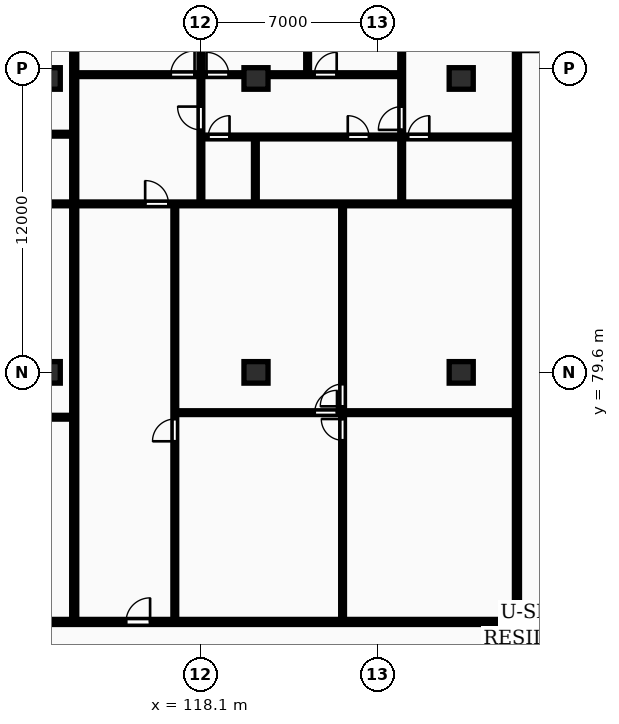
"""IFC4 building model, lengths in metres.
Left out: names, types, materials, properties, quantities, classifications, styles, units other than length and angle.
Written with IfcOpenShell. Run it as: python <this file> out.ifc"""

import sys

from ifc_helpers import new_model, si_unit, direction, frame, frame_2d, origin, origin_2d, place, context, subcontext, project, spatial, rectangle, extrude, element, fill, save


model = new_model("IFC4")
c1 = context("Model", 3, precision=1e-05, world=origin(), true_north=direction((0.0, 1.0)))
c2 = subcontext(c1, "Body", "Model", "MODEL_VIEW")
j1 = project(units=[si_unit("LENGTHUNIT", "METRE"), si_unit("PLANEANGLEUNIT", "RADIAN")], contexts=[c1])
p1 = place(None, origin())
s1 = spatial("IfcSite", under=j1, at=p1, CompositionType="ELEMENT")
p2 = place(p1, origin())
s2 = spatial("IfcBuilding", under=s1, at=p2, CompositionType="ELEMENT")
p3 = place(p2, frame((0.0, 0.0, 126.3)))
s3 = spatial("IfcBuildingStorey", under=s2, at=p3, CompositionType="ELEMENT", Elevation=126.3)
for number, where, z_axis, x_axis in (
    (1, (112.1, 79.6, 0.0), (0.0, 0.0, 1.0), (1.0, 0.0, 0.0)),
    (2, (112.1, 91.2, 0.0), (0.0, 0.0, 1.0), (1.0, 0.0, 0.0)),
    (3, (120.3, 79.6, 0.0), (0.0, 0.0, 1.0), (1.0, 0.0, 0.0)),
    (4, (120.3, 91.2, 0.0), (0.0, 0.0, 1.0), (1.0, 0.0, 0.0)),
    (5, (128.4, 79.6, 0.0), (0.0, 0.0, 1.0), (1.0, 0.0, 0.0)),
    (6, (128.4, 91.2, 0.0), (0.0, 0.0, 1.0), (1.0, 0.0, 0.0)),
):
    element("IfcColumn", number, at=place(p3, frame(where, z_axis=z_axis, x_axis=x_axis)), inside=s3, PredefinedType="COLUMN", context=c2, shape_type="SweptSolid", body=[
        extrude(rectangle(XDim=0.95, YDim=0.85, at=origin_2d()), origin(), (0.0, 0.0, 1.0), 3.25),
    ])
for number, where, z_axis, x_axis in (
    (7, (130.6, 69.83, 0.0), (0.0, 0.0, 1.0), (0.0, 1.0, 0.0)),
    (8, (113.125, 69.83, 0.0), (0.0, 0.0, 1.0), (0.0, 1.0, 0.0)),
):
    element("IfcWall", number, at=place(p3, frame(where, z_axis=z_axis, x_axis=x_axis)), inside=s3, PredefinedType="PARTITIONING", context=c2, shape_type="SweptSolid", body=[
        extrude(rectangle(XDim=26.07, YDim=0.2, at=frame_2d((13.035, 0.0))), origin(), (0.0, 0.0, 1.0), 2.97),
    ])
p4 = place(p3, frame((96.867, 77.83, 0.0), z_axis=(0.0, 0.0, 1.0), x_axis=(1.0, 0.0, 0.0)))
e9 = element("IfcWall", 9, at=p4, inside=s3, PredefinedType="PARTITIONING", context=c2, shape_type="SweptSolid", body=[
    extrude(rectangle(XDim=16.177, YDim=0.15, at=frame_2d((8.089, 0.0))), origin(), (0.0, 0.0, 1.0), 2.97),
])
p5 = place(p4, frame((3.45, 0.0, 0.0)))
e10 = element("IfcOpeningElement", 10, at=p5, cuts=e9, PredefinedType="OPENING", context=c2, shape_type="SweptSolid", body=[
    extrude(rectangle(XDim=0.88, YDim=2.06, at=frame_2d((0.44, 1.03))), frame((0.0, 0.085, 0.0), z_axis=(0.0, -1.0, 0.0), x_axis=(1.0, 0.0, 0.0)), (0.0, 0.0, 1.0), 0.17),
])
p6 = place(p3, frame((97.667, 89.0, 0.0), z_axis=(0.0, 0.0, 1.0), x_axis=(1.0, 0.0, 0.0)))
e11 = element("IfcWall", 11, at=p6, inside=s3, PredefinedType="PARTITIONING", context=c2, shape_type="SweptSolid", body=[
    extrude(rectangle(XDim=15.377, YDim=0.15, at=frame_2d((7.689, 0.0))), origin(), (0.0, 0.0, 1.0), 2.97),
])
p7 = place(p6, frame((1.191, 0.0, 0.0)))
e12 = element("IfcOpeningElement", 12, at=p7, cuts=e11, PredefinedType="OPENING", context=c2, shape_type="SweptSolid", body=[
    extrude(rectangle(XDim=0.84, YDim=2.04, at=frame_2d((0.42, 1.02))), frame((0.0, 0.085, 0.0), z_axis=(0.0, -1.0, 0.0), x_axis=(1.0, 0.0, 0.0)), (0.0, 0.0, 1.0), 0.17),
])
p8 = place(p6, frame((7.269, 0.0, 0.0)))
e13 = element("IfcOpeningElement", 13, at=p8, cuts=e11, PredefinedType="OPENING", context=c2, shape_type="SweptSolid", body=[
    extrude(rectangle(XDim=0.84, YDim=2.04, at=frame_2d((0.42, 1.02))), frame((0.0, 0.085, 0.0), z_axis=(0.0, -1.0, 0.0), x_axis=(1.0, 0.0, 0.0)), (0.0, 0.0, 1.0), 0.17),
])
p9 = place(p6, frame((10.938, 0.0, 0.0)))
e14 = element("IfcOpeningElement", 14, at=p9, cuts=e11, PredefinedType="OPENING", context=c2, shape_type="SweptSolid", body=[
    extrude(rectangle(XDim=0.84, YDim=2.04, at=frame_2d((0.42, 1.02))), frame((0.0, 0.085, 0.0), z_axis=(0.0, -1.0, 0.0), x_axis=(1.0, 0.0, 0.0)), (0.0, 0.0, 1.0), 0.17),
])
p10 = place(p3, frame((92.917, 86.25, 0.0), z_axis=(0.0, 0.0, 1.0), x_axis=(1.0, 0.0, 0.0)))
e15 = element("IfcWall", 15, at=p10, inside=s3, PredefinedType="PARTITIONING", context=c2, shape_type="SweptSolid", body=[
    extrude(rectangle(XDim=20.127, YDim=0.15, at=frame_2d((10.064, 0.0))), origin(), (0.0, 0.0, 1.0), 2.97),
])
p11 = place(p10, frame((2.72, 0.0, 0.0)))
e16 = element("IfcOpeningElement", 16, at=p11, cuts=e15, PredefinedType="OPENING", context=c2, shape_type="SweptSolid", body=[
    extrude(rectangle(XDim=0.92, YDim=2.08, at=frame_2d((0.46, 1.04))), frame((0.0, 0.085, 0.0), z_axis=(0.0, -1.0, 0.0), x_axis=(1.0, 0.0, 0.0)), (0.0, 0.0, 1.0), 0.17),
])
p12 = place(p3, frame((123.718, 69.81, 0.0), z_axis=(0.0, 0.0, 1.0), x_axis=(0.0, 1.0, 0.0)))
e17 = element("IfcWall", 17, at=p12, inside=s3, PredefinedType="PARTITIONING", context=c2, shape_type="SweptSolid", body=[
    extrude(rectangle(XDim=16.4, YDim=0.15, at=frame_2d((8.2, 0.0))), origin(), (0.0, 0.0, 1.0), 2.97),
])
p13 = place(p12, frame((7.11, 0.0, 0.0)))
e18 = element("IfcOpeningElement", 18, at=p13, cuts=e17, PredefinedType="OPENING", context=c2, shape_type="SweptSolid", body=[
    extrude(rectangle(XDim=0.84, YDim=2.04, at=frame_2d((0.42, 1.02))), frame((0.0, 0.085, 0.0), z_axis=(0.0, -1.0, 0.0), x_axis=(1.0, 0.0, 0.0)), (0.0, 0.0, 1.0), 0.17),
])
p14 = place(p12, frame((8.45, 0.0, 0.0)))
e19 = element("IfcOpeningElement", 19, at=p14, cuts=e17, PredefinedType="OPENING", context=c2, shape_type="SweptSolid", body=[
    extrude(rectangle(XDim=0.88, YDim=2.06, at=frame_2d((0.44, 1.03))), frame((0.0, 0.085, 0.0), z_axis=(0.0, -1.0, 0.0), x_axis=(1.0, 0.0, 0.0)), (0.0, 0.0, 1.0), 0.17),
])
p15 = place(p3, frame((117.155, 78.01, 0.0), z_axis=(0.0, 0.0, 1.0), x_axis=(1.0, 0.0, 0.0)))
e20 = element("IfcWall", 20, at=p15, inside=s3, PredefinedType="PARTITIONING", context=c2, shape_type="SweptSolid", body=[
    extrude(rectangle(XDim=13.365, YDim=0.15, at=frame_2d((6.683, 0.0))), origin(), (0.0, 0.0, 1.0), 2.97),
])
p16 = place(p15, frame((5.462, 0.0, 0.0)))
e21 = element("IfcOpeningElement", 21, at=p16, cuts=e20, PredefinedType="OPENING", context=c2, shape_type="SweptSolid", body=[
    extrude(rectangle(XDim=0.88, YDim=2.06, at=frame_2d((0.44, 1.03))), frame((0.0, 0.085, 0.0), z_axis=(0.0, -1.0, 0.0), x_axis=(1.0, 0.0, 0.0)), (0.0, 0.0, 1.0), 0.17),
])
p17 = place(p3, frame((117.095, 69.81, 0.0), z_axis=(0.0, 0.0, 1.0), x_axis=(0.0, 1.0, 0.0)))
e22 = element("IfcWall", 22, at=p17, inside=s3, PredefinedType="PARTITIONING", context=c2, shape_type="SweptSolid", body=[
    extrude(rectangle(XDim=16.4, YDim=0.15, at=frame_2d((8.2, 0.0))), origin(), (0.0, 0.0, 1.0), 2.97),
])
p18 = place(p17, frame((7.07, 0.0, 0.0)))
e23 = element("IfcOpeningElement", 23, at=p18, cuts=e22, PredefinedType="OPENING", context=c2, shape_type="SweptSolid", body=[
    extrude(rectangle(XDim=0.88, YDim=2.06, at=frame_2d((0.44, 1.03))), frame((0.0, 0.085, 0.0), z_axis=(0.0, -1.0, 0.0), x_axis=(1.0, 0.0, 0.0)), (0.0, 0.0, 1.0), 0.17),
])
p19 = place(p3, frame((120.275, 86.29, 0.0), z_axis=(0.0, 0.0, 1.0), x_axis=(0.0, 1.0, 0.0)))
e24 = element("IfcWall", 24, at=p19, inside=s3, PredefinedType="PARTITIONING", context=c2, shape_type="SweptSolid", body=[
    extrude(rectangle(XDim=2.58, YDim=0.15, at=frame_2d((1.29, 0.0))), origin(), (0.0, 0.0, 1.0), 2.277),
])
p20 = place(p3, frame((122.337, 91.43, 0.0), z_axis=(0.0, 0.0, 1.0), x_axis=(0.0, 1.0, 0.0)))
e25 = element("IfcWall", 25, at=p20, inside=s3, PredefinedType="PARTITIONING", context=c2, shape_type="SweptSolid", body=[
    extrude(rectangle(XDim=4.47, YDim=0.15, at=frame_2d((2.235, 0.0))), origin(), (0.0, 0.0, 1.0), 2.97),
])
p21 = place(p3, frame((118.125, 86.29, 0.0), z_axis=(0.0, 0.0, 1.0), x_axis=(0.0, 1.0, 0.0)))
e26 = element("IfcWall", 26, at=p21, inside=s3, PredefinedType="PARTITIONING", context=c2, shape_type="SweptSolid", body=[
    extrude(rectangle(XDim=9.61, YDim=0.15, at=frame_2d((4.805, 0.0))), origin(), (0.0, 0.0, 1.0), 2.97),
])
p22 = place(p21, frame((2.88, 0.0, 0.0)))
e27 = element("IfcOpeningElement", 27, at=p22, cuts=e26, PredefinedType="OPENING", context=c2, shape_type="SweptSolid", body=[
    extrude(rectangle(XDim=0.92, YDim=2.08, at=frame_2d((0.46, 1.04))), frame((0.0, 0.085, 0.0), z_axis=(0.0, -1.0, 0.0), x_axis=(1.0, 0.0, 0.0)), (0.0, 0.0, 1.0), 0.17),
])
p23 = place(p3, frame((126.05, 86.29, 0.0), z_axis=(0.0, 0.0, 1.0), x_axis=(0.0, 1.0, 0.0)))
e28 = element("IfcWall", 28, at=p23, inside=s3, PredefinedType="PARTITIONING", context=c2, shape_type="SweptSolid", body=[
    extrude(rectangle(XDim=2.58, YDim=0.15, at=frame_2d((1.29, 0.0))), origin(), (0.0, 0.0, 1.0), 2.97),
])
p24 = place(p3, frame((126.05, 88.91, 0.0), z_axis=(0.0, 0.0, 1.0), x_axis=(0.0, 1.0, 0.0)))
e29 = element("IfcWall", 29, at=p24, inside=s3, PredefinedType="PARTITIONING", context=c2, shape_type="SweptSolid", body=[
    extrude(rectangle(XDim=6.99, YDim=0.15, at=frame_2d((3.495, 0.0))), origin(), (0.0, 0.0, 1.0), 2.97),
])
p25 = place(p24, frame((0.26, 0.0, 0.0)))
e30 = element("IfcOpeningElement", 30, at=p25, cuts=e29, PredefinedType="OPENING", context=c2, shape_type="SweptSolid", body=[
    extrude(rectangle(XDim=0.92, YDim=2.08, at=frame_2d((0.46, 1.04))), frame((0.0, 0.085, 0.0), z_axis=(0.0, -1.0, 0.0), x_axis=(1.0, 0.0, 0.0)), (0.0, 0.0, 1.0), 0.17),
])
p26 = place(p3, frame((118.165, 88.89, 0.0), z_axis=(0.0, 0.0, 1.0), x_axis=(1.0, 0.0, 0.0)))
e31 = element("IfcWall", 31, at=p26, inside=s3, PredefinedType="PARTITIONING", context=c2, shape_type="SweptSolid", body=[
    extrude(rectangle(XDim=12.355, YDim=0.15, at=frame_2d((6.177, 0.0))), origin(), (0.0, 0.0, 1.0), 2.97),
])
p27 = place(p26, frame((0.25, 0.0, 0.0)))
e32 = element("IfcOpeningElement", 32, at=p27, cuts=e31, PredefinedType="OPENING", context=c2, shape_type="SweptSolid", body=[
    extrude(rectangle(XDim=0.84, YDim=2.04, at=frame_2d((0.42, 1.02))), frame((0.0, 0.085, 0.0), z_axis=(0.0, -1.0, 0.0), x_axis=(1.0, 0.0, 0.0)), (0.0, 0.0, 1.0), 0.17),
])
p28 = place(p26, frame((5.758, 0.0, 0.0)))
e33 = element("IfcOpeningElement", 33, at=p28, cuts=e31, PredefinedType="OPENING", context=c2, shape_type="SweptSolid", body=[
    extrude(rectangle(XDim=0.84, YDim=2.04, at=frame_2d((0.42, 1.02))), frame((0.0, 0.085, 0.0), z_axis=(0.0, -1.0, 0.0), x_axis=(1.0, 0.0, 0.0)), (0.0, 0.0, 1.0), 0.17),
])
p29 = place(p26, frame((8.135, 0.0, 0.0)))
e34 = element("IfcOpeningElement", 34, at=p29, cuts=e31, PredefinedType="OPENING", context=c2, shape_type="SweptSolid", body=[
    extrude(rectangle(XDim=0.84, YDim=2.04, at=frame_2d((0.42, 1.02))), frame((0.0, 0.085, 0.0), z_axis=(0.0, -1.0, 0.0), x_axis=(1.0, 0.0, 0.0)), (0.0, 0.0, 1.0), 0.17),
])
p30 = place(p3, frame((113.205, 86.25, 0.0), z_axis=(0.0, 0.0, 1.0), x_axis=(1.0, 0.0, 0.0)))
e35 = element("IfcWall", 35, at=p30, inside=s3, PredefinedType="PARTITIONING", context=c2, shape_type="SweptSolid", body=[
    extrude(rectangle(XDim=17.315, YDim=0.15, at=frame_2d((8.657, 0.0))), origin(), (0.0, 0.0, 1.0), 2.97),
])
p31 = place(p30, frame((2.72, 0.0, 0.0)))
e36 = element("IfcOpeningElement", 36, at=p31, cuts=e35, PredefinedType="OPENING", context=c2, shape_type="SweptSolid", body=[
    extrude(rectangle(XDim=0.92, YDim=2.08, at=frame_2d((0.46, 1.04))), frame((0.0, 0.085, 0.0), z_axis=(0.0, -1.0, 0.0), x_axis=(1.0, 0.0, 0.0)), (0.0, 0.0, 1.0), 0.17),
])
p32 = place(p3, frame((113.205, 91.35, 0.0), z_axis=(0.0, 0.0, 1.0), x_axis=(1.0, 0.0, 0.0)))
e37 = element("IfcWall", 37, at=p32, inside=s3, PredefinedType="PARTITIONING", context=c2, shape_type="SweptSolid", body=[
    extrude(rectangle(XDim=12.845, YDim=0.15, at=frame_2d((6.422, 0.0))), origin(), (0.0, 0.0, 1.0), 2.663),
])
p33 = place(p32, frame((3.73, 0.0, 0.0)))
e38 = element("IfcOpeningElement", 38, at=p33, cuts=e37, PredefinedType="OPENING", context=c2, shape_type="SweptSolid", body=[
    extrude(rectangle(XDim=0.94, YDim=2.1, at=frame_2d((0.47, 1.05))), frame((0.0, 0.085, 0.0), z_axis=(0.0, -1.0, 0.0), x_axis=(1.0, 0.0, 0.0)), (0.0, 0.0, 1.0), 0.17),
])
p34 = place(p32, frame((5.14, 0.0, 0.0)))
e39 = element("IfcOpeningElement", 39, at=p34, cuts=e37, PredefinedType="OPENING", context=c2, shape_type="SweptSolid", body=[
    extrude(rectangle(XDim=0.88, YDim=2.06, at=frame_2d((0.44, 1.03))), frame((0.0, 0.085, 0.0), z_axis=(0.0, -1.0, 0.0), x_axis=(1.0, 0.0, 0.0)), (0.0, 0.0, 1.0), 0.17),
])
p35 = place(p32, frame((9.4, 0.0, 0.0)))
e40 = element("IfcOpeningElement", 40, at=p35, cuts=e37, PredefinedType="OPENING", context=c2, shape_type="SweptSolid", body=[
    extrude(rectangle(XDim=0.88, YDim=2.06, at=frame_2d((0.44, 1.03))), frame((0.0, 0.085, 0.0), z_axis=(0.0, -1.0, 0.0), x_axis=(1.0, 0.0, 0.0)), (0.0, 0.0, 1.0), 0.17),
])
p36 = place(p3, frame((57.6, 69.75, 0.0), z_axis=(0.0, 0.0, 1.0), x_axis=(1.0, 0.0, 0.0)))
e41 = element("IfcWall", 41, at=p36, inside=s3, PredefinedType="PARTITIONING", context=c2, shape_type="SweptSolid", body=[
    extrude(rectangle(XDim=73.0, YDim=0.2, at=frame_2d((36.5, 0.0))), origin(), (0.0, 0.0, 1.0), 2.97),
])
p37 = place(p36, frame((6.629, 0.0, 0.0)))
e42 = element("IfcOpeningElement", 42, at=p37, cuts=e41, PredefinedType="OPENING", context=c2, shape_type="SweptSolid", body=[
    extrude(rectangle(XDim=1.22, YDim=2.18, at=frame_2d((0.61, 1.09))), frame((0.0, 0.11, 0.0), z_axis=(0.0, -1.0, 0.0), x_axis=(1.0, 0.0, 0.0)), (0.0, 0.0, 1.0), 0.22),
])
p38 = place(p36, frame((24.022, 0.0, 0.0)))
e43 = element("IfcOpeningElement", 43, at=p38, cuts=e41, PredefinedType="OPENING", context=c2, shape_type="SweptSolid", body=[
    extrude(rectangle(XDim=1.22, YDim=2.18, at=frame_2d((0.61, 1.09))), frame((0.0, 0.11, 0.0), z_axis=(0.0, -1.0, 0.0), x_axis=(1.0, 0.0, 0.0)), (0.0, 0.0, 1.0), 0.22),
])
p39 = place(p36, frame((37.768, 0.0, 0.0)))
e44 = element("IfcOpeningElement", 44, at=p39, cuts=e41, PredefinedType="OPENING", context=c2, shape_type="SweptSolid", body=[
    extrude(rectangle(XDim=0.95, YDim=2.15, at=frame_2d((0.475, 1.075))), frame((0.0, 0.11, 0.0), z_axis=(0.0, -1.0, 0.0), x_axis=(1.0, 0.0, 0.0)), (0.0, 0.0, 1.0), 0.22),
])
p40 = place(p36, frame((57.57, 0.0, 0.0)))
e45 = element("IfcOpeningElement", 45, at=p40, cuts=e41, PredefinedType="OPENING", context=c2, shape_type="SweptSolid", body=[
    extrude(rectangle(XDim=0.95, YDim=2.15, at=frame_2d((0.475, 1.075))), frame((0.0, 0.11, 0.0), z_axis=(0.0, -1.0, 0.0), x_axis=(1.0, 0.0, 0.0)), (0.0, 0.0, 1.0), 0.22),
])
p41 = place(p13, origin())
e46 = element("IfcDoor", 46, at=p41, inside=s3, OperationType="SINGLE_SWING_RIGHT", PredefinedType="DOOR", context=c2, shape_type="SweptSolid", body=[
    extrude(rectangle(XDim=0.84, YDim=2.04, at=frame_2d((0.42, 1.02))), frame((0.0, 0.025, 0.0), z_axis=(0.0, -1.0, 0.0), x_axis=(1.0, 0.0, 0.0)), (0.0, 0.0, 1.0), 0.05),
])
fill(e18, e46)
p42 = place(p14, origin())
e47 = element("IfcDoor", 47, at=p42, inside=s3, OperationType="SINGLE_SWING_LEFT", PredefinedType="DOOR", context=c2, shape_type="SweptSolid", body=[
    extrude(rectangle(XDim=0.88, YDim=2.06, at=frame_2d((0.44, 1.03))), frame((0.0, 0.025, 0.0), z_axis=(0.0, -1.0, 0.0), x_axis=(1.0, 0.0, 0.0)), (0.0, 0.0, 1.0), 0.05),
])
fill(e19, e47)
p43 = place(p16, origin())
e48 = element("IfcDoor", 48, at=p43, inside=s3, OperationType="SINGLE_SWING_RIGHT", PredefinedType="DOOR", context=c2, shape_type="SweptSolid", body=[
    extrude(rectangle(XDim=0.88, YDim=2.06, at=frame_2d((0.44, 1.03))), frame((0.0, 0.025, 0.0), z_axis=(0.0, -1.0, 0.0), x_axis=(1.0, 0.0, 0.0)), (0.0, 0.0, 1.0), 0.05),
])
fill(e21, e48)
p44 = place(p18, origin())
e49 = element("IfcDoor", 49, at=p44, inside=s3, OperationType="SINGLE_SWING_LEFT", PredefinedType="DOOR", context=c2, shape_type="SweptSolid", body=[
    extrude(rectangle(XDim=0.88, YDim=2.06, at=frame_2d((0.44, 1.03))), frame((0.0, 0.025, 0.0), z_axis=(0.0, -1.0, 0.0), x_axis=(1.0, 0.0, 0.0)), (0.0, 0.0, 1.0), 0.05),
])
fill(e23, e49)
p45 = place(p22, origin())
e50 = element("IfcDoor", 50, at=p45, inside=s3, OperationType="SINGLE_SWING_RIGHT", PredefinedType="DOOR", context=c2, shape_type="SweptSolid", body=[
    extrude(rectangle(XDim=0.92, YDim=2.08, at=frame_2d((0.46, 1.04))), frame((0.0, 0.025, 0.0), z_axis=(0.0, -1.0, 0.0), x_axis=(1.0, 0.0, 0.0)), (0.0, 0.0, 1.0), 0.05),
])
fill(e27, e50)
p46 = place(p25, origin())
e51 = element("IfcDoor", 51, at=p46, inside=s3, OperationType="SINGLE_SWING_LEFT", PredefinedType="DOOR", context=c2, shape_type="SweptSolid", body=[
    extrude(rectangle(XDim=0.92, YDim=2.08, at=frame_2d((0.46, 1.04))), frame((0.0, 0.025, 0.0), z_axis=(0.0, -1.0, 0.0), x_axis=(1.0, 0.0, 0.0)), (0.0, 0.0, 1.0), 0.05),
])
fill(e30, e51)
p47 = place(p27, origin())
e52 = element("IfcDoor", 52, at=p47, inside=s3, OperationType="SINGLE_SWING_RIGHT", PredefinedType="DOOR", context=c2, shape_type="SweptSolid", body=[
    extrude(rectangle(XDim=0.84, YDim=2.04, at=frame_2d((0.42, 1.02))), frame((0.0, 0.025, 0.0), z_axis=(0.0, -1.0, 0.0), x_axis=(1.0, 0.0, 0.0)), (0.0, 0.0, 1.0), 0.05),
])
fill(e32, e52)
p48 = place(p28, origin())
e53 = element("IfcDoor", 53, at=p48, inside=s3, OperationType="SINGLE_SWING_LEFT", PredefinedType="DOOR", context=c2, shape_type="SweptSolid", body=[
    extrude(rectangle(XDim=0.84, YDim=2.04, at=frame_2d((0.42, 1.02))), frame((0.0, 0.025, 0.0), z_axis=(0.0, -1.0, 0.0), x_axis=(1.0, 0.0, 0.0)), (0.0, 0.0, 1.0), 0.05),
])
fill(e33, e53)
p49 = place(p29, origin())
e54 = element("IfcDoor", 54, at=p49, inside=s3, OperationType="SINGLE_SWING_RIGHT", PredefinedType="DOOR", context=c2, shape_type="SweptSolid", body=[
    extrude(rectangle(XDim=0.84, YDim=2.04, at=frame_2d((0.42, 1.02))), frame((0.0, 0.025, 0.0), z_axis=(0.0, -1.0, 0.0), x_axis=(1.0, 0.0, 0.0)), (0.0, 0.0, 1.0), 0.05),
])
fill(e34, e54)
p50 = place(p31, origin())
e55 = element("IfcDoor", 55, at=p50, inside=s3, OperationType="SINGLE_SWING_LEFT", PredefinedType="DOOR", context=c2, shape_type="SweptSolid", body=[
    extrude(rectangle(XDim=0.92, YDim=2.08, at=frame_2d((0.46, 1.04))), frame((0.0, 0.025, 0.0), z_axis=(0.0, -1.0, 0.0), x_axis=(1.0, 0.0, 0.0)), (0.0, 0.0, 1.0), 0.05),
])
fill(e36, e55)
p51 = place(p33, origin())
e56 = element("IfcDoor", 56, at=p51, inside=s3, OperationType="SINGLE_SWING_RIGHT", PredefinedType="DOOR", context=c2, shape_type="SweptSolid", body=[
    extrude(rectangle(XDim=0.94, YDim=2.1, at=frame_2d((0.47, 1.05))), frame((0.0, 0.025, 0.0), z_axis=(0.0, -1.0, 0.0), x_axis=(1.0, 0.0, 0.0)), (0.0, 0.0, 1.0), 0.05),
])
fill(e38, e56)
p52 = place(p34, origin())
e57 = element("IfcDoor", 57, at=p52, inside=s3, OperationType="SINGLE_SWING_LEFT", PredefinedType="DOOR", context=c2, shape_type="SweptSolid", body=[
    extrude(rectangle(XDim=0.88, YDim=2.06, at=frame_2d((0.44, 1.03))), frame((0.0, 0.025, 0.0), z_axis=(0.0, -1.0, 0.0), x_axis=(1.0, 0.0, 0.0)), (0.0, 0.0, 1.0), 0.05),
])
fill(e39, e57)
p53 = place(p35, origin())
e58 = element("IfcDoor", 58, at=p53, inside=s3, OperationType="SINGLE_SWING_RIGHT", PredefinedType="DOOR", context=c2, shape_type="SweptSolid", body=[
    extrude(rectangle(XDim=0.88, YDim=2.06, at=frame_2d((0.44, 1.03))), frame((0.0, 0.025, 0.0), z_axis=(0.0, -1.0, 0.0), x_axis=(1.0, 0.0, 0.0)), (0.0, 0.0, 1.0), 0.05),
])
fill(e40, e58)
p54 = place(p40, origin())
e59 = element("IfcDoor", 59, at=p54, inside=s3, OperationType="SINGLE_SWING_RIGHT", PredefinedType="DOOR", context=c2, shape_type="SweptSolid", body=[
    extrude(rectangle(XDim=0.95, YDim=2.15, at=frame_2d((0.475, 1.075))), frame((0.0, 0.025, 0.0), z_axis=(0.0, -1.0, 0.0), x_axis=(1.0, 0.0, 0.0)), (0.0, 0.0, 1.0), 0.05),
])
fill(e45, e59)
save(model, sys.argv[1])
